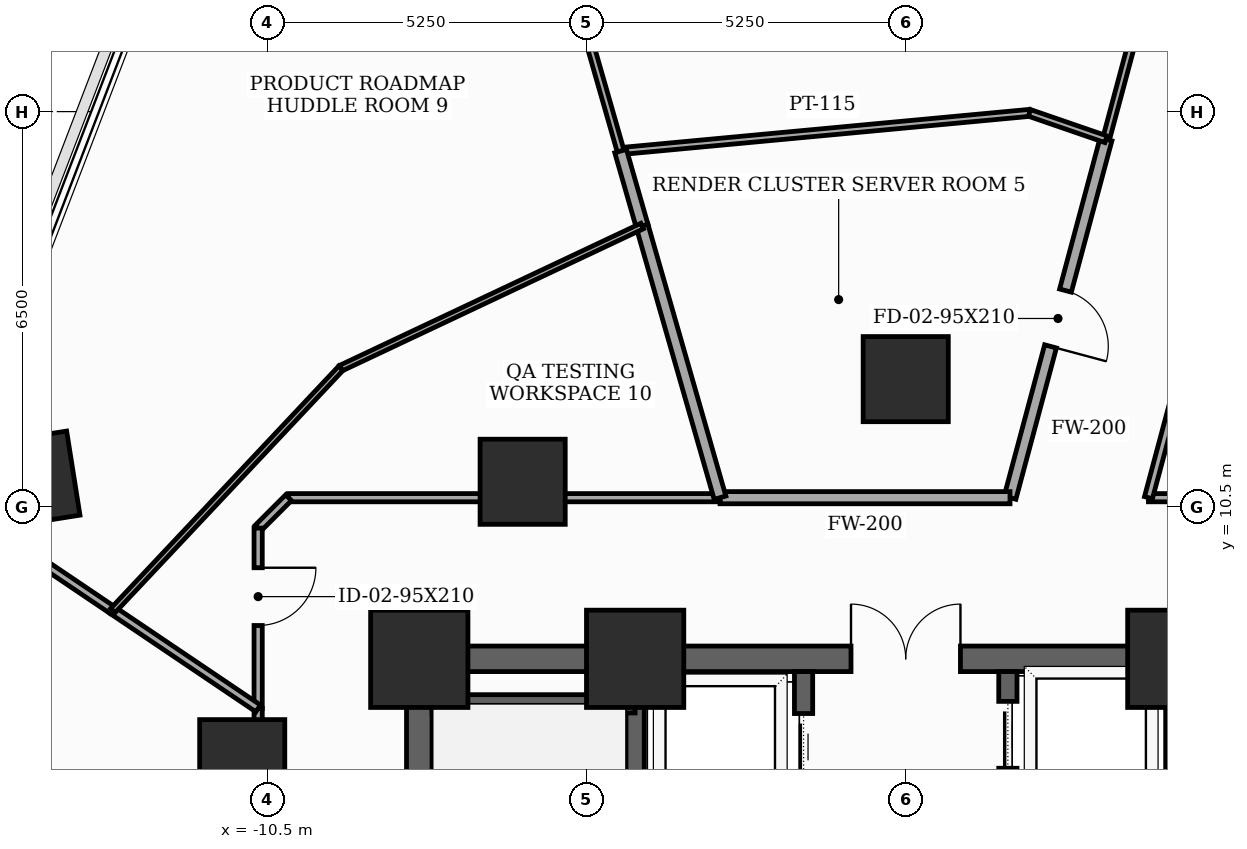
"""IFC4 building model, lengths in metres.
Left out: names, types, materials, properties, quantities, classifications, styles, units other than length and angle.
Written with IfcOpenShell. Run it as: python <this file> out.ifc"""

import sys

from ifc_helpers import new_model, si_unit, direction, frame, frame_2d, origin, origin_2d, place, context, subcontext, project, spatial, rectangle, extrude, element, fill, save


model = new_model("IFC4")
c1 = context("Model", 3, precision=1e-05, world=origin(), true_north=direction((0.0, 1.0)))
c2 = subcontext(c1, "Body", "Model", "MODEL_VIEW")
j1 = project(units=[si_unit("LENGTHUNIT", "METRE"), si_unit("PLANEANGLEUNIT", "RADIAN")], contexts=[c1])
p1 = place(None, origin())
s1 = spatial("IfcSite", under=j1, at=p1, CompositionType="ELEMENT")
p2 = place(p1, origin())
s2 = spatial("IfcBuilding", under=s1, at=p2, CompositionType="ELEMENT")
p3 = place(p2, frame((0.0, 0.0, 63.0)))
s3 = spatial("IfcBuildingStorey", under=s2, at=p3, CompositionType="ELEMENT", Elevation=63.0)
for number, where, z_axis, x_axis in (
    (1, (4.45, 8.0, 0.0), (0.0, 0.0, 1.0), (1.0, 0.0, 0.0)),
    (2, (-4.45, 8.0, 0.0), (0.0, 0.0, 1.0), (1.0, 0.0, 0.0)),
    (3, (-8.0, 8.0, 0.0), (0.0, 0.0, 1.0), (1.0, 0.0, 0.0)),
):
    element("IfcColumn", number, at=place(p3, frame(where, z_axis=z_axis, x_axis=x_axis)), inside=s3, PredefinedType="COLUMN", context=c2, shape_type="SweptSolid", body=[
        extrude(rectangle(XDim=1.6, YDim=1.6, at=origin_2d()), origin(), (0.0, 0.0, 1.0), 3.7),
    ])
for number, where, z_axis, x_axis in (
    (4, (0.0, 12.6, 0.0), (0.0, 0.0, 1.0), (1.0, 0.0, 0.0)),
    (5, (-6.3, 10.912, 0.0), (0.0, 0.0, 1.0), (1.0, 0.0, 0.0)),
    (6, (-10.912, 6.3, 0.0), (0.0, 0.0, 1.0), (1.0, 0.0, 0.0)),
    (7, (-14.381, 10.945, 0.0), (0.0, 0.0, 1.0), (0.988, 0.156, 0.0)),
):
    element("IfcColumn", number, at=place(p3, frame(where, z_axis=z_axis, x_axis=x_axis)), inside=s3, PredefinedType="COLUMN", context=c2, shape_type="SweptSolid", body=[
        extrude(rectangle(XDim=1.4, YDim=1.4, at=origin_2d()), origin(), (0.0, 0.0, 1.0), 3.7),
    ])
p4 = place(p3, frame((-8.0, -8.0, 0.0), z_axis=(0.0, 0.0, 1.0), x_axis=(0.0, 1.0, 0.0)))
e8 = element("IfcWall", 8, at=p4, inside=s3, PredefinedType="SHEAR", context=c2, shape_type="SweptSolid", body=[
    extrude(rectangle(XDim=16.0, YDim=0.42, at=frame_2d((8.0, 0.0))), origin(), (0.0, 0.0, 1.0), 3.5),
])
p5 = place(p4, frame((1.002, 0.0, 0.0)))
e9 = element("IfcOpeningElement", 9, at=p5, cuts=e8, PredefinedType="OPENING", context=c2, shape_type="SweptSolid", body=[
    extrude(rectangle(XDim=0.85, YDim=2.02, at=frame_2d((0.425, 1.01))), frame((0.0, 0.22, 0.0), z_axis=(0.0, -1.0, 0.0), x_axis=(1.0, 0.0, 0.0)), (0.0, 0.0, 1.0), 0.44),
])
p6 = place(p4, frame((5.35, 0.0, 0.0)))
e10 = element("IfcOpeningElement", 10, at=p6, cuts=e8, PredefinedType="OPENING", context=c2, shape_type="SweptSolid", body=[
    extrude(rectangle(XDim=1.05, YDim=2.15, at=frame_2d((0.525, 1.075))), frame((0.0, 0.22, 0.0), z_axis=(0.0, -1.0, 0.0), x_axis=(1.0, 0.0, 0.0)), (0.0, 0.0, 1.0), 0.44),
])
p7 = place(p3, frame((-8.0, 8.0, 0.0), z_axis=(0.0, 0.0, 1.0), x_axis=(1.0, 0.0, 0.0)))
e11 = element("IfcWall", 11, at=p7, inside=s3, PredefinedType="SHEAR", context=c2, shape_type="SweptSolid", body=[
    extrude(rectangle(XDim=16.0, YDim=0.42, at=frame_2d((8.0, 0.0))), origin(), (0.0, 0.0, 1.0), 3.5),
])
p8 = place(p7, frame((7.1, 0.0, 0.0)))
e12 = element("IfcOpeningElement", 12, at=p8, cuts=e11, PredefinedType="OPENING", context=c2, shape_type="SweptSolid", body=[
    extrude(rectangle(XDim=1.8, YDim=2.15, at=frame_2d((0.9, 1.075))), frame((0.0, 0.22, 0.0), z_axis=(0.0, -1.0, 0.0), x_axis=(1.0, 0.0, 0.0)), (0.0, 0.0, 1.0), 0.44),
])
p9 = place(p3, frame((-4.45, -7.79, 0.0), z_axis=(0.0, 0.0, 1.0), x_axis=(0.0, 1.0, 0.0)))
e13 = element("IfcWall", 13, at=p9, inside=s3, PredefinedType="SHEAR", context=c2, shape_type="SweptSolid", body=[
    extrude(rectangle(XDim=15.58, YDim=0.3, at=frame_2d((7.79, 0.0))), origin(), (0.0, 0.0, 1.0), 3.5),
])
p10 = place(p3, frame((-7.79, 7.26, 0.0), z_axis=(0.0, 0.0, 1.0), x_axis=(1.0, 0.0, 0.0)))
e14 = element("IfcWall", 14, at=p10, inside=s3, PredefinedType="SHEAR", context=c2, shape_type="SweptSolid", body=[
    extrude(rectangle(XDim=3.34, YDim=0.3, at=frame_2d((1.67, 0.0))), origin(), (0.0, 0.0, 1.0), 3.5),
])
p11 = place(p3, frame((-1.68, -4.85, 0.0), z_axis=(0.0, 0.0, 1.0), x_axis=(0.0, 1.0, 0.0)))
e15 = element("IfcWall", 15, at=p11, inside=s3, PredefinedType="SHEAR", context=c2, shape_type="SweptSolid", body=[
    extrude(rectangle(XDim=12.64, YDim=0.3, at=frame_2d((6.32, 0.0))), origin(), (0.0, 0.0, 1.0), 3.5),
])
p12 = place(p11, frame((3.95, 0.0, 0.0)))
e16 = element("IfcOpeningElement", 16, at=p12, cuts=e15, PredefinedType="OPENING", context=c2, shape_type="SweptSolid", body=[
    extrude(rectangle(XDim=1.1, YDim=2.1, at=frame_2d((0.55, 1.05))), frame((0.0, 0.16, 0.0), z_axis=(0.0, -1.0, 0.0), x_axis=(1.0, 0.0, 0.0)), (0.0, 0.0, 1.0), 0.32),
])
p13 = place(p11, frame((6.25, 0.0, 0.0)))
e17 = element("IfcOpeningElement", 17, at=p13, cuts=e15, PredefinedType="OPENING", context=c2, shape_type="SweptSolid", body=[
    extrude(rectangle(XDim=1.1, YDim=2.1, at=frame_2d((0.55, 1.05))), frame((0.0, 0.16, 0.0), z_axis=(0.0, -1.0, 0.0), x_axis=(1.0, 0.0, 0.0)), (0.0, 0.0, 1.0), 0.32),
])
p14 = place(p11, frame((8.55, 0.0, 0.0)))
e18 = element("IfcOpeningElement", 18, at=p14, cuts=e15, PredefinedType="OPENING", context=c2, shape_type="SweptSolid", body=[
    extrude(rectangle(XDim=1.1, YDim=2.1, at=frame_2d((0.55, 1.05))), frame((0.0, 0.16, 0.0), z_axis=(0.0, -1.0, 0.0), x_axis=(1.0, 0.0, 0.0)), (0.0, 0.0, 1.0), 0.32),
])
p15 = place(p11, frame((10.85, 0.0, 0.0)))
e19 = element("IfcOpeningElement", 19, at=p15, cuts=e15, PredefinedType="OPENING", context=c2, shape_type="SweptSolid", body=[
    extrude(rectangle(XDim=1.1, YDim=2.1, at=frame_2d((0.55, 1.05))), frame((0.0, 0.16, 0.0), z_axis=(0.0, -1.0, 0.0), x_axis=(1.0, 0.0, 0.0)), (0.0, 0.0, 1.0), 0.32),
])
p16 = place(p11, frame((0.45, 0.0, 0.0)))
e20 = element("IfcOpeningElement", 20, at=p16, cuts=e15, PredefinedType="OPENING", context=c2, shape_type="SweptSolid", body=[
    extrude(rectangle(XDim=0.85, YDim=2.02, at=frame_2d((0.425, 1.01))), frame((0.0, 0.16, 0.0), z_axis=(0.0, -1.0, 0.0), x_axis=(1.0, 0.0, 0.0)), (0.0, 0.0, 1.0), 0.32),
])
p17 = place(p11, frame((2.05, 0.0, 0.0)))
e21 = element("IfcOpeningElement", 21, at=p17, cuts=e15, PredefinedType="OPENING", context=c2, shape_type="SweptSolid", body=[
    extrude(rectangle(XDim=0.85, YDim=2.02, at=frame_2d((0.425, 1.01))), frame((0.0, 0.16, 0.0), z_axis=(0.0, -1.0, 0.0), x_axis=(1.0, 0.0, 0.0)), (0.0, 0.0, 1.0), 0.32),
])
p18 = place(p3, frame((1.68, -4.85, 0.0), z_axis=(0.0, 0.0, 1.0), x_axis=(0.0, 1.0, 0.0)))
e22 = element("IfcWall", 22, at=p18, inside=s3, PredefinedType="SHEAR", context=c2, shape_type="SweptSolid", body=[
    extrude(rectangle(XDim=12.64, YDim=0.3, at=frame_2d((6.32, 0.0))), origin(), (0.0, 0.0, 1.0), 3.5),
])
p19 = place(p18, frame((0.55, 0.0, 0.0)))
e23 = element("IfcOpeningElement", 23, at=p19, cuts=e22, PredefinedType="OPENING", context=c2, shape_type="SweptSolid", body=[
    extrude(rectangle(XDim=1.1, YDim=2.1, at=frame_2d((0.55, 1.05))), frame((0.0, 0.16, 0.0), z_axis=(0.0, -1.0, 0.0), x_axis=(1.0, 0.0, 0.0)), (0.0, 0.0, 1.0), 0.32),
])
p20 = place(p18, frame((2.65, 0.0, 0.0)))
e24 = element("IfcOpeningElement", 24, at=p20, cuts=e22, PredefinedType="OPENING", context=c2, shape_type="SweptSolid", body=[
    extrude(rectangle(XDim=1.1, YDim=2.1, at=frame_2d((0.55, 1.05))), frame((0.0, 0.16, 0.0), z_axis=(0.0, -1.0, 0.0), x_axis=(1.0, 0.0, 0.0)), (0.0, 0.0, 1.0), 0.32),
])
p21 = place(p18, frame((4.75, 0.0, 0.0)))
e25 = element("IfcOpeningElement", 25, at=p21, cuts=e22, PredefinedType="OPENING", context=c2, shape_type="SweptSolid", body=[
    extrude(rectangle(XDim=1.1, YDim=2.1, at=frame_2d((0.55, 1.05))), frame((0.0, 0.16, 0.0), z_axis=(0.0, -1.0, 0.0), x_axis=(1.0, 0.0, 0.0)), (0.0, 0.0, 1.0), 0.32),
])
p22 = place(p18, frame((6.85, 0.0, 0.0)))
e26 = element("IfcOpeningElement", 26, at=p22, cuts=e22, PredefinedType="OPENING", context=c2, shape_type="SweptSolid", body=[
    extrude(rectangle(XDim=1.1, YDim=2.1, at=frame_2d((0.55, 1.05))), frame((0.0, 0.16, 0.0), z_axis=(0.0, -1.0, 0.0), x_axis=(1.0, 0.0, 0.0)), (0.0, 0.0, 1.0), 0.32),
])
p23 = place(p18, frame((8.95, 0.0, 0.0)))
e27 = element("IfcOpeningElement", 27, at=p23, cuts=e22, PredefinedType="OPENING", context=c2, shape_type="SweptSolid", body=[
    extrude(rectangle(XDim=1.1, YDim=2.1, at=frame_2d((0.55, 1.05))), frame((0.0, 0.16, 0.0), z_axis=(0.0, -1.0, 0.0), x_axis=(1.0, 0.0, 0.0)), (0.0, 0.0, 1.0), 0.32),
])
p24 = place(p18, frame((11.05, 0.0, 0.0)))
e28 = element("IfcOpeningElement", 28, at=p24, cuts=e22, PredefinedType="OPENING", context=c2, shape_type="SweptSolid", body=[
    extrude(rectangle(XDim=1.1, YDim=2.1, at=frame_2d((0.55, 1.05))), frame((0.0, 0.16, 0.0), z_axis=(0.0, -1.0, 0.0), x_axis=(1.0, 0.0, 0.0)), (0.0, 0.0, 1.0), 0.32),
])
p25 = place(p3, frame((-10.65, 7.184, 0.0), z_axis=(0.0, 0.0, 1.0), x_axis=(0.0, -1.0, 0.0)))
e29 = element("IfcWall", 29, at=p25, inside=s3, PredefinedType="PARTITIONING", context=c2, shape_type="SweptSolid", body=[
    extrude(rectangle(XDim=8.899, YDim=0.135, at=frame_2d((4.45, 0.0))), origin(), (0.0, 0.0, 1.0), 2.785),
])
p26 = place(p3, frame((10.15, 10.65, 0.0), z_axis=(0.0, 0.0, 1.0), x_axis=(-1.0, 0.0, 0.0)))
e30 = element("IfcWall", 30, at=p26, inside=s3, PredefinedType="PARTITIONING", context=c2, shape_type="SweptSolid", body=[
    extrude(rectangle(XDim=6.158, YDim=0.135, at=frame_2d((3.079, 0.0))), origin(), (0.0, 0.0, 1.0), 2.785),
])
p27 = place(p26, frame((0.757, 0.0, 0.0)))
e31 = element("IfcOpeningElement", 31, at=p27, cuts=e30, PredefinedType="OPENING", context=c2, shape_type="SweptSolid", body=[
    extrude(rectangle(XDim=0.95, YDim=2.1, at=frame_2d((0.475, 1.05))), frame((0.0, 0.077, 0.0), z_axis=(0.0, -1.0, 0.0), x_axis=(1.0, 0.0, 0.0)), (0.0, 0.0, 1.0), 0.155),
])
p28 = place(p3, frame((3.992, 10.65, 0.0), z_axis=(0.0, 0.0, 1.0), x_axis=(0.258952377387, 0.965890090148, 0.0)))
e32 = element("IfcWall", 32, at=p28, inside=s3, PredefinedType="PARTITIONING", context=c2, shape_type="SweptSolid", body=[
    extrude(rectangle(XDim=5.36, YDim=0.135, at=frame_2d((2.68, 0.0))), origin(), (0.0, 0.0, 1.0), 2.785),
])
p29 = place(p3, frame((4.269, 20.183, 0.0), z_axis=(0.0, 0.0, 1.0), x_axis=(-0.258880798168, -0.965909277489, 0.0)))
e33 = element("IfcWall", 33, at=p29, inside=s3, PredefinedType="PARTITIONING", context=c2, shape_type="SweptSolid", body=[
    extrude(rectangle(XDim=3.767, YDim=0.115, at=frame_2d((1.883, 0.0))), origin(), (0.0, 0.0, 1.0), 3.085),
])
p30 = place(p3, frame((3.294, 16.545, 0.0), z_axis=(0.0, 0.0, 1.0), x_axis=(-0.258710756328, -0.965954835673, 0.0)))
e34 = element("IfcWall", 34, at=p30, inside=s3, PredefinedType="SOLIDWALL", context=c2, shape_type="SweptSolid", body=[
    extrude(rectangle(XDim=6.103, YDim=0.2, at=frame_2d((3.051, 0.0))), origin(), (0.0, 0.0, 1.0), 2.785),
])
p31 = place(p30, frame((2.576, 0.0, 0.0)))
e35 = element("IfcOpeningElement", 35, at=p31, cuts=e34, PredefinedType="OPENING", context=c2, shape_type="SweptSolid", body=[
    extrude(rectangle(XDim=0.95, YDim=2.1, at=frame_2d((0.475, 1.05))), frame((0.0, 0.11, 0.0), z_axis=(0.0, -1.0, 0.0), x_axis=(1.0, 0.0, 0.0)), (0.0, 0.0, 1.0), 0.22),
])
p32 = place(p3, frame((1.715, 10.65, 0.0), z_axis=(0.0, 0.0, 1.0), x_axis=(-1.0, 0.0, 0.0)))
e36 = element("IfcWall", 36, at=p32, inside=s3, PredefinedType="SOLIDWALL", context=c2, shape_type="SweptSolid", body=[
    extrude(rectangle(XDim=4.769, YDim=0.2, at=frame_2d((2.385, 0.0))), origin(), (0.0, 0.0, 1.0), 2.785),
])
p33 = place(p3, frame((-3.054, 10.65, 0.0), z_axis=(0.0, 0.0, 1.0), x_axis=(-1.0, 0.0, 0.0)))
e37 = element("IfcWall", 37, at=p33, inside=s3, PredefinedType="PARTITIONING", context=c2, shape_type="SweptSolid", body=[
    extrude(rectangle(XDim=7.096, YDim=0.135, at=frame_2d((3.548, 0.0))), origin(), (0.0, 0.0, 1.0), 2.785),
])
p34 = place(p3, frame((-10.15, 10.65, 0.0), z_axis=(0.0, 0.0, 1.0), x_axis=(-0.707106781187, -0.707106781187, 0.0)))
e38 = element("IfcWall", 38, at=p34, inside=s3, PredefinedType="PARTITIONING", context=c2, shape_type="SweptSolid", body=[
    extrude(rectangle(XDim=0.707, YDim=0.135, at=frame_2d((0.354, 0.0))), origin(), (0.0, 0.0, 1.0), 3.5),
])
p35 = place(p3, frame((-10.65, 10.15, 0.0), z_axis=(0.0, 0.0, 1.0), x_axis=(0.0, -1.0, 0.0)))
e39 = element("IfcWall", 39, at=p35, inside=s3, PredefinedType="PARTITIONING", context=c2, shape_type="SweptSolid", body=[
    extrude(rectangle(XDim=2.966, YDim=0.135, at=frame_2d((1.483, 0.0))), origin(), (0.0, 0.0, 1.0), 3.5),
])
p36 = place(p35, frame((0.652, 0.0, 0.0)))
e40 = element("IfcOpeningElement", 40, at=p36, cuts=e39, PredefinedType="OPENING", context=c2, shape_type="SweptSolid", body=[
    extrude(rectangle(XDim=0.95, YDim=2.1, at=frame_2d((0.475, 1.05))), frame((0.0, 0.077, 0.0), z_axis=(0.0, -1.0, 0.0), x_axis=(1.0, 0.0, 0.0)), (0.0, 0.0, 1.0), 0.155),
])
p37 = place(p3, frame((-13.038, 8.795, 0.0), z_axis=(0.0, 0.0, 1.0), x_axis=(-0.829071326064, 0.559142858578, 0.0)))
e41 = element("IfcWall", 41, at=p37, inside=s3, PredefinedType="PARTITIONING", context=c2, shape_type="SweptSolid", body=[
    extrude(rectangle(XDim=3.279, YDim=0.135, at=frame_2d((1.639, 0.0))), origin(), (0.0, 0.0, 1.0), 2.785),
])
p38 = place(p3, frame((-10.65, 7.184, 0.0), z_axis=(0.0, 0.0, 1.0), x_axis=(-0.829039234985, 0.559190438809, 0.0)))
e42 = element("IfcWall", 42, at=p38, inside=s3, PredefinedType="PARTITIONING", context=c2, shape_type="SweptSolid", body=[
    extrude(rectangle(XDim=2.881, YDim=0.135, at=frame_2d((1.44, 0.0))), origin(), (0.0, 0.0, 1.0), 2.785),
])
p39 = place(p3, frame((-4.689, 16.351, 0.0), z_axis=(0.0, 0.0, 1.0), x_axis=(0.995667654368, 0.092983450384, 0.0)))
e43 = element("IfcWall", 43, at=p39, inside=s3, PredefinedType="PARTITIONING", context=c2, shape_type="SweptSolid", body=[
    extrude(rectangle(XDim=6.753, YDim=0.115, at=frame_2d((3.376, 0.0))), origin(), (0.0, 0.0, 1.0), 2.785),
])
p40 = place(p3, frame((2.035, 16.979, 0.0), z_axis=(0.0, 0.0, 1.0), x_axis=(0.945388565789, -0.325945485742, 0.0)))
e44 = element("IfcWall", 44, at=p40, inside=s3, PredefinedType="PARTITIONING", context=c2, shape_type="SweptSolid", body=[
    extrude(rectangle(XDim=1.332, YDim=0.115, at=frame_2d((0.666, 0.0))), origin(), (0.0, 0.0, 1.0), 3.5),
])
p41 = place(p3, frame((-8.481, 29.58, 0.0), z_axis=(0.0, 0.0, 1.0), x_axis=(0.275587979828, -0.961275852903, 0.0)))
e45 = element("IfcWall", 45, at=p41, inside=s3, PredefinedType="PARTITIONING", context=c2, shape_type="SweptSolid", body=[
    extrude(rectangle(XDim=13.761, YDim=0.115, at=frame_2d((6.881, 0.0))), origin(), (0.0, 0.0, 1.0), 2.935),
])
p42 = place(p41, frame((6.421, 0.0, 0.0)))
e46 = element("IfcOpeningElement", 46, at=p42, cuts=e45, PredefinedType="OPENING", context=c2, shape_type="SweptSolid", body=[
    extrude(rectangle(XDim=0.92, YDim=2.1, at=frame_2d((0.46, 1.05))), frame((0.0, 0.067, 0.0), z_axis=(0.0, -1.0, 0.0), x_axis=(1.0, 0.0, 0.0)), (0.0, 0.0, 1.0), 0.135),
])
p43 = place(p3, frame((-4.689, 16.351, 0.0), z_axis=(0.0, 0.0, 1.0), x_axis=(0.275927308223, -0.961178506094, 0.0)))
e47 = element("IfcWall", 47, at=p43, inside=s3, PredefinedType="SOLIDWALL", context=c2, shape_type="SweptSolid", body=[
    extrude(rectangle(XDim=1.283, YDim=0.2, at=frame_2d((0.642, 0.0))), origin(), (0.0, 0.0, 1.0), 3.5),
])
p44 = place(p3, frame((-4.335, 15.118, 0.0), z_axis=(0.0, 0.0, 1.0), x_axis=(0.275602055924, -0.961271817318, 0.0)))
e48 = element("IfcWall", 48, at=p44, inside=s3, PredefinedType="SOLIDWALL", context=c2, shape_type="SweptSolid", body=[
    extrude(rectangle(XDim=4.648, YDim=0.2, at=frame_2d((2.324, 0.0))), origin(), (0.0, 0.0, 1.0), 2.785),
])
p45 = place(p3, frame((-13.038, 8.795, 0.0), z_axis=(0.0, 0.0, 1.0), x_axis=(0.685214439986, 0.728341383716, 0.0)))
e49 = element("IfcWall", 49, at=p45, inside=s3, PredefinedType="MOVABLE", context=c2, shape_type="SweptSolid", body=[
    extrude(rectangle(XDim=5.474, YDim=0.1, at=frame_2d((2.737, 0.0))), origin(), (0.0, 0.0, 1.0), 2.785),
])
p46 = place(p3, frame((-9.287, 12.782, 0.0), z_axis=(0.0, 0.0, 1.0), x_axis=(0.904430294069, 0.4266214284, 0.0)))
e50 = element("IfcWall", 50, at=p46, inside=s3, PredefinedType="MOVABLE", context=c2, shape_type="SweptSolid", body=[
    extrude(rectangle(XDim=5.475, YDim=0.1, at=frame_2d((2.738, 0.0))), origin(), (0.0, 0.0, 1.0), 2.785),
])
p47 = place(p8, origin())
e51 = element("IfcDoor", 51, at=p47, inside=s3, OperationType="DOUBLE_DOOR_SINGLE_SWING", PredefinedType="DOOR", context=c2, shape_type="SweptSolid", body=[
    extrude(rectangle(XDim=1.8, YDim=2.15, at=frame_2d((0.9, 1.075))), frame((0.0, 0.025, 0.0), z_axis=(0.0, -1.0, 0.0), x_axis=(1.0, 0.0, 0.0)), (0.0, 0.0, 1.0), 0.05),
])
fill(e12, e51)
p48 = place(p15, origin())
e52 = element("IfcDoor", 52, at=p48, inside=s3, OperationType="SLIDING_TO_LEFT", PredefinedType="DOOR", context=c2, shape_type="SweptSolid", body=[
    extrude(rectangle(XDim=1.1, YDim=2.1, at=frame_2d((0.55, 1.05))), frame((0.0, 0.025, 0.0), z_axis=(0.0, -1.0, 0.0), x_axis=(1.0, 0.0, 0.0)), (0.0, 0.0, 1.0), 0.05),
])
fill(e19, e52)
p49 = place(p24, origin())
e53 = element("IfcDoor", 53, at=p49, inside=s3, OperationType="SLIDING_TO_LEFT", PredefinedType="DOOR", context=c2, shape_type="SweptSolid", body=[
    extrude(rectangle(XDim=1.1, YDim=2.1, at=frame_2d((0.55, 1.05))), frame((0.0, 0.025, 0.0), z_axis=(0.0, -1.0, 0.0), x_axis=(1.0, 0.0, 0.0)), (0.0, 0.0, 1.0), 0.05),
])
fill(e28, e53)
p50 = place(p31, origin())
e54 = element("IfcDoor", 54, at=p50, inside=s3, OperationType="SINGLE_SWING_RIGHT", PredefinedType="DOOR", context=c2, shape_type="SweptSolid", body=[
    extrude(rectangle(XDim=0.95, YDim=2.1, at=frame_2d((0.475, 1.05))), frame((0.0, 0.025, 0.0), z_axis=(0.0, -1.0, 0.0), x_axis=(1.0, 0.0, 0.0)), (0.0, 0.0, 1.0), 0.05),
])
fill(e35, e54)
p51 = place(p36, origin())
e55 = element("IfcDoor", 55, at=p51, inside=s3, OperationType="SINGLE_SWING_LEFT", PredefinedType="DOOR", context=c2, shape_type="SweptSolid", body=[
    extrude(rectangle(XDim=0.95, YDim=2.1, at=frame_2d((0.475, 1.05))), frame((0.0, 0.025, 0.0), z_axis=(0.0, -1.0, 0.0), x_axis=(1.0, 0.0, 0.0)), (0.0, 0.0, 1.0), 0.05),
])
fill(e40, e55)
save(model, sys.argv[1])
